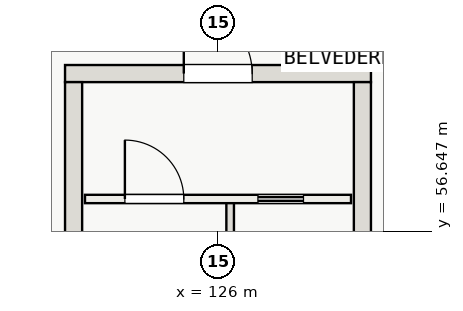
"""IFC4 building model, lengths in metres.
Left out: names, types, materials, properties, quantities, classifications, styles, units other than length and angle.
Written with IfcOpenShell. Run it as: python <this file> out.ifc"""

import sys

from ifc_helpers import new_model, si_unit, direction, frame, frame_2d, origin, place, context, subcontext, project, spatial, rectangle, extrude, element, fill, save


model = new_model("IFC4")
c1 = context("Model", 3, precision=1e-05, world=origin(), true_north=direction((0.0, 1.0)))
c2 = subcontext(c1, "Body", "Model", "MODEL_VIEW")
j1 = project(units=[si_unit("LENGTHUNIT", "METRE"), si_unit("PLANEANGLEUNIT", "RADIAN")], contexts=[c1])
p1 = place(None, origin())
s1 = spatial("IfcSite", under=j1, at=p1, CompositionType="ELEMENT")
p2 = place(p1, origin())
s2 = spatial("IfcBuilding", under=s1, at=p2, CompositionType="ELEMENT")
p3 = place(p2, frame((0.0, 0.0, 21.6)))
s3 = spatial("IfcBuildingStorey", under=s2, at=p3, CompositionType="ELEMENT", Elevation=21.6)
p4 = place(p3, frame((121.975, 60.8, 0.0), z_axis=(0.0, 0.0, 1.0), x_axis=(1.0, 0.0, 0.0)))
e1 = element("IfcWall", 1, at=p4, inside=s3, PredefinedType="SHEAR", context=c2, shape_type="SweptSolid", body=[
    extrude(rectangle(XDim=8.05, YDim=0.45, at=frame_2d((4.025, 0.0))), origin(), (0.0, 0.0, 1.0), 4.8),
])
p5 = place(p4, frame((3.125, 0.0, 0.0)))
e2 = element("IfcOpeningElement", 2, at=p5, cuts=e1, PredefinedType="OPENING", context=c2, shape_type="SweptSolid", body=[
    extrude(rectangle(XDim=1.8, YDim=2.3, at=frame_2d((0.9, 1.15))), frame((0.0, 0.235, 0.0), z_axis=(0.0, -1.0, 0.0), x_axis=(1.0, 0.0, 0.0)), (0.0, 0.0, 1.0), 0.47),
])
for number, where, z_axis, x_axis in (
    (3, (122.2, 49.425, 0.0), (0.0, 0.0, 1.0), (0.0, 1.0, 0.0)),
    (4, (129.8, 49.425, 0.0), (0.0, 0.0, 1.0), (0.0, 1.0, 0.0)),
):
    element("IfcWall", number, at=place(p3, frame(where, z_axis=z_axis, x_axis=x_axis)), inside=s3, PredefinedType="SHEAR", context=c2, shape_type="SweptSolid", body=[
        extrude(rectangle(XDim=11.15, YDim=0.45, at=frame_2d((5.575, 0.0))), origin(), (0.0, 0.0, 1.0), 4.8),
    ])
p6 = place(p3, frame((126.32, 49.45, 0.0), z_axis=(0.0, 0.0, 1.0), x_axis=(0.0, 1.0, 0.0)))
e5 = element("IfcWall", 5, at=p6, inside=s3, PredefinedType="SOLIDWALL", context=c2, shape_type="SweptSolid", body=[
    extrude(rectangle(XDim=8.0, YDim=0.2, at=frame_2d((4.0, 0.0))), origin(), (0.0, 0.0, 1.0), 4.8),
])
p7 = place(p3, frame((122.5, 57.5, 0.0), z_axis=(0.0, 0.0, 1.0), x_axis=(1.0, 0.0, 0.0)))
e6 = element("IfcWall", 6, at=p7, inside=s3, PredefinedType="SOLIDWALL", context=c2, shape_type="SweptSolid", body=[
    extrude(rectangle(XDim=7.0, YDim=0.22, at=frame_2d((3.5, 0.0))), origin(), (0.0, 0.0, 1.0), 4.53),
])
p8 = place(p7, frame((1.05, 0.0, 0.0)))
e7 = element("IfcOpeningElement", 7, at=p8, cuts=e6, PredefinedType="OPENING", context=c2, shape_type="SweptSolid", body=[
    extrude(rectangle(XDim=1.55, YDim=2.2, at=frame_2d((0.775, 1.1))), frame((0.0, 0.12, 0.0), z_axis=(0.0, -1.0, 0.0), x_axis=(1.0, 0.0, 0.0)), (0.0, 0.0, 1.0), 0.24),
])
p9 = place(p7, frame((4.55, 0.0, 0.0)))
e8 = element("IfcOpeningElement", 8, at=p9, cuts=e6, PredefinedType="OPENING", context=c2, shape_type="SweptSolid", body=[
    extrude(rectangle(XDim=1.2, YDim=2.2, at=frame_2d((0.6, 1.1))), frame((0.0, 0.12, 0.0), z_axis=(0.0, -1.0, 0.0), x_axis=(1.0, 0.0, 0.0)), (0.0, 0.0, 1.0), 0.24),
])
p10 = place(p8, origin())
e9 = element("IfcDoor", 9, at=p10, inside=s3, OperationType="SINGLE_SWING_LEFT", PredefinedType="DOOR", context=c2, shape_type="SweptSolid", body=[
    extrude(rectangle(XDim=1.55, YDim=2.2, at=frame_2d((0.775, 1.1))), frame((0.0, 0.025, 0.0), z_axis=(0.0, -1.0, 0.0), x_axis=(1.0, 0.0, 0.0)), (0.0, 0.0, 1.0), 0.05),
])
fill(e7, e9)
p11 = place(p9, origin())
e10 = element("IfcDoor", 10, at=p11, inside=s3, OperationType="SLIDING_TO_LEFT", PredefinedType="DOOR", context=c2, shape_type="SweptSolid", body=[
    extrude(rectangle(XDim=1.2, YDim=2.2, at=frame_2d((0.6, 1.1))), frame((0.0, 0.025, 0.0), z_axis=(0.0, -1.0, 0.0), x_axis=(1.0, 0.0, 0.0)), (0.0, 0.0, 1.0), 0.05),
])
fill(e8, e10)
p12 = place(p5, frame((1.8, 0.0, 0.0), z_axis=(0.0, 0.0, 1.0), x_axis=(-1.0, 0.0, 0.0)))
e11 = element("IfcDoor", 11, at=p12, inside=s3, OperationType="DOUBLE_DOOR_SINGLE_SWING", PredefinedType="DOOR", context=c2, shape_type="SweptSolid", body=[
    extrude(rectangle(XDim=1.8, YDim=2.3, at=frame_2d((0.9, 1.15))), frame((0.0, 0.025, 0.0), z_axis=(0.0, -1.0, 0.0), x_axis=(1.0, 0.0, 0.0)), (0.0, 0.0, 1.0), 0.05),
])
fill(e2, e11)
save(model, sys.argv[1])
